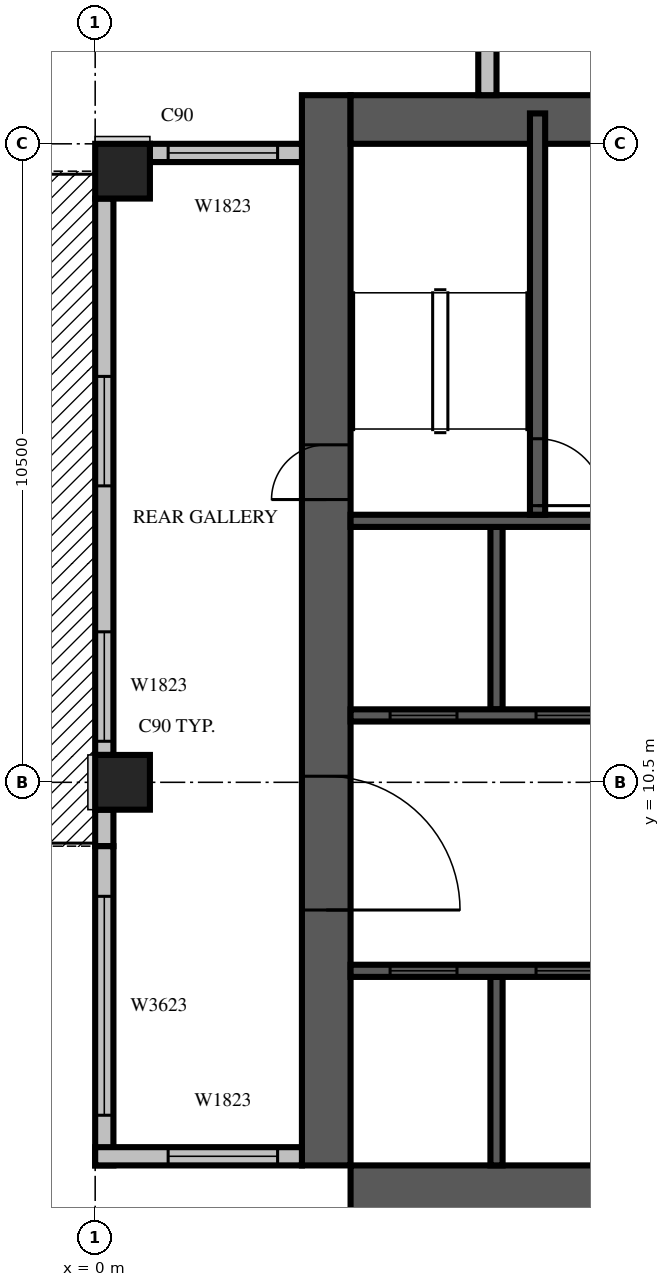
"""IFC4 building model, lengths in metres.
Left out: names, types, materials, properties, quantities, classifications, styles, units other than length and angle.
Written with IfcOpenShell. Run it as: python <this file> out.ifc"""

import sys

from ifc_helpers import new_model, si_unit, direction, frame, frame_2d, origin, origin_2d, place, context, subcontext, project, spatial, rectangle, extrude, source, transform, mapped, element, fill, save


model = new_model("IFC4")
c1 = context("Model", 3, precision=1e-05, world=origin(), true_north=direction((0.0, 1.0)))
c2 = subcontext(c1, "Body", "Model", "MODEL_VIEW")
j1 = project(units=[si_unit("LENGTHUNIT", "METRE"), si_unit("PLANEANGLEUNIT", "RADIAN")], contexts=[c1])
p1 = place(None, origin())
s1 = spatial("IfcSite", under=j1, at=p1, CompositionType="ELEMENT")
p2 = place(p1, origin())
s2 = spatial("IfcBuilding", under=s1, at=p2, CompositionType="ELEMENT")
p3 = place(p2, frame((0.0, 0.0, 200.6)))
s3 = spatial("IfcBuildingStorey", under=s2, at=p3, CompositionType="ELEMENT", Elevation=200.6)
m1 = source(origin(), c2, "Body", "SweptSolid", [
    extrude(rectangle(XDim=0.9, YDim=0.9, at=origin_2d()), origin(), (0.0, 0.0, 1.0), 3.8),
])
for number, where, z_axis, x_axis in (
    (1, (0.45, 10.5, 0.0), (0.0, 0.0, 1.0), (1.0, 0.0, 0.0)),
    (2, (0.45, 20.55, 0.0), (0.0, 0.0, 1.0), (1.0, 0.0, 0.0)),
):
    element("IfcColumn", number, at=place(p3, frame(where, z_axis=z_axis, x_axis=x_axis)), inside=s3, PredefinedType="COLUMN", context=c2, shape_type="MappedRepresentation", body=[
        mapped(m1, transform((0.0, 0.0, 0.0), scale=1.0)),
    ])
m2 = source(origin(), c2, "Body", "SweptSolid", [
    extrude(rectangle(XDim=17.6, YDim=0.8, at=frame_2d((8.8, 0.0))), origin(), (0.0, 0.0, 1.0), 3.8),
])
p4 = place(p3, frame((3.8, 4.2, 0.0), z_axis=(0.0, 0.0, 1.0), x_axis=(0.0, 1.0, 0.0)))
e3 = element("IfcWall", 3, at=p4, inside=s3, PredefinedType="SHEAR", context=c2, shape_type="MappedRepresentation", body=[
    mapped(m2, transform((0.0, 0.0, 0.0), scale=1.0)),
])
m3 = source(origin(), c2, "Body", "SweptSolid", [
    extrude(rectangle(XDim=2.2, YDim=2.1, at=frame_2d((1.1, 1.05))), frame((0.0, 0.41, 0.0), z_axis=(0.0, -1.0, 0.0), x_axis=(1.0, 0.0, 0.0)), (0.0, 0.0, 1.0), 0.82),
])
p5 = place(p4, frame((4.2, 0.0, 0.0)))
e4 = element("IfcOpeningElement", 4, at=p5, cuts=e3, PredefinedType="OPENING", context=c2, shape_type="MappedRepresentation", body=[
    mapped(m3, transform((0.0, 0.0, 0.0), scale=1.0)),
])
m4 = source(origin(), c2, "Body", "SweptSolid", [
    extrude(rectangle(XDim=0.9, YDim=2.1, at=frame_2d((0.45, 1.05))), frame((0.0, 0.41, 0.0), z_axis=(0.0, -1.0, 0.0), x_axis=(1.0, 0.0, 0.0)), (0.0, 0.0, 1.0), 0.82),
])
p6 = place(p4, frame((10.95, 0.0, 0.0)))
e5 = element("IfcOpeningElement", 5, at=p6, cuts=e3, PredefinedType="OPENING", context=c2, shape_type="MappedRepresentation", body=[
    mapped(m4, transform((0.0, 0.0, 0.0), scale=1.0)),
])
p7 = place(p3, frame((4.2, 3.8, 0.0), z_axis=(0.0, 0.0, 1.0), x_axis=(1.0, 0.0, 0.0)))
e6 = element("IfcWall", 6, at=p7, inside=s3, PredefinedType="SHEAR", context=c2, shape_type="MappedRepresentation", body=[
    mapped(m2, transform((0.0, 0.0, 0.0), scale=1.0)),
])
p8 = place(p7, frame((12.75, 0.0, 0.0)))
e7 = element("IfcOpeningElement", 7, at=p8, cuts=e6, PredefinedType="OPENING", context=c2, shape_type="MappedRepresentation", body=[
    mapped(m4, transform((0.0, 0.0, 0.0), scale=1.0)),
])
m5 = source(origin(), c2, "Body", "SweptSolid", [
    extrude(rectangle(XDim=16.8, YDim=0.8, at=frame_2d((8.4, 0.0))), origin(), (0.0, 0.0, 1.0), 3.8),
])
p9 = place(p3, frame((4.2, 21.4, 0.0), z_axis=(0.0, 0.0, 1.0), x_axis=(1.0, 0.0, 0.0)))
e8 = element("IfcWall", 8, at=p9, inside=s3, PredefinedType="SHEAR", context=c2, shape_type="MappedRepresentation", body=[
    mapped(m5, transform((0.0, 0.0, 0.0), scale=1.0)),
])
m6 = source(origin(), c2, "Body", "SweptSolid", [
    extrude(rectangle(XDim=1.2, YDim=2.1, at=frame_2d((0.6, 1.05))), frame((0.0, 0.41, 0.0), z_axis=(0.0, -1.0, 0.0), x_axis=(1.0, 0.0, 0.0)), (0.0, 0.0, 1.0), 0.82),
])
p10 = place(p9, frame((6.2, 0.0, 0.0)))
e9 = element("IfcOpeningElement", 9, at=p10, cuts=e8, PredefinedType="OPENING", context=c2, shape_type="MappedRepresentation", body=[
    mapped(m6, transform((0.0, 0.0, 0.0), scale=1.0)),
])
m7 = source(origin(), c2, "Body", "SweptSolid", [
    extrude(rectangle(XDim=16.6, YDim=0.3, at=frame_2d((8.3, 0.0))), origin(), (0.0, 0.0, 1.0), 3.4),
])
p11 = place(p3, frame((6.45, 38.4, 0.0), z_axis=(0.0, 0.0, 1.0), x_axis=(0.0, -1.0, 0.0)))
e10 = element("IfcWall", 10, at=p11, inside=s3, PredefinedType="STANDARD", context=c2, shape_type="MappedRepresentation", body=[
    mapped(m7, transform((0.0, 0.0, 0.0), scale=1.0)),
])
m8 = source(origin(), c2, "Body", "SweptSolid", [
    extrude(rectangle(XDim=1.8, YDim=2.3, at=frame_2d((0.9, 1.15))), frame((0.0, 0.16, 0.0), z_axis=(0.0, -1.0, 0.0), x_axis=(1.0, 0.0, 0.0)), (0.0, 0.0, 1.0), 0.32),
])
p12 = place(p11, frame((1.15, 0.0, 0.6)))
e11 = element("IfcOpeningElement", 11, at=p12, cuts=e10, PredefinedType="OPENING", context=c2, shape_type="MappedRepresentation", body=[
    mapped(m8, transform((0.0, 0.0, 0.0), scale=1.0)),
])
p13 = place(p11, frame((9.438, 0.0, 0.6)))
e12 = element("IfcOpeningElement", 12, at=p13, cuts=e10, PredefinedType="OPENING", context=c2, shape_type="MappedRepresentation", body=[
    mapped(m8, transform((0.0, 0.0, 0.0), scale=1.0)),
])
m9 = source(origin(), c2, "Body", "SweptSolid", [
    extrude(rectangle(XDim=1.2, YDim=2.3, at=frame_2d((0.6, 1.15))), frame((0.0, 0.16, 0.0), z_axis=(0.0, -1.0, 0.0), x_axis=(1.0, 0.0, 0.0)), (0.0, 0.0, 1.0), 0.32),
])
p14 = place(p11, frame((14.338, 0.0, 0.6)))
e13 = element("IfcOpeningElement", 13, at=p14, cuts=e10, PredefinedType="OPENING", context=c2, shape_type="MappedRepresentation", body=[
    mapped(m9, transform((0.0, 0.0, 0.0), scale=1.0)),
])
p15 = place(p11, frame((11.887, 0.0, 0.6)))
e14 = element("IfcOpeningElement", 14, at=p15, cuts=e10, PredefinedType="OPENING", context=c2, shape_type="MappedRepresentation", body=[
    mapped(m8, transform((0.0, 0.0, 0.0), scale=1.0)),
])
m10 = source(origin(), c2, "Body", "SweptSolid", [
    extrude(rectangle(XDim=1.0, YDim=2.1, at=frame_2d((0.5, 1.05))), frame((0.0, 0.16, 0.0), z_axis=(0.0, -1.0, 0.0), x_axis=(1.0, 0.0, 0.0)), (0.0, 0.0, 1.0), 0.32),
])
p16 = place(p11, frame((5.908, 0.0, 0.0)))
e15 = element("IfcOpeningElement", 15, at=p16, cuts=e10, PredefinedType="OPENING", context=c2, shape_type="MappedRepresentation", body=[
    mapped(m10, transform((0.0, 0.0, 0.0), scale=1.0)),
])
m11 = source(origin(), c2, "Body", "SweptSolid", [
    extrude(rectangle(XDim=2.5, YDim=0.3, at=frame_2d((1.25, 0.0))), origin(), (0.0, 0.0, 1.0), 3.4),
])
p17 = place(p3, frame((3.4, 20.85, 0.0), z_axis=(0.0, 0.0, 1.0), x_axis=(-1.0, 0.0, 0.0)))
e16 = element("IfcWall", 16, at=p17, inside=s3, PredefinedType="STANDARD", context=c2, shape_type="MappedRepresentation", body=[
    mapped(m11, transform((0.0, 0.0, 0.0), scale=1.0)),
])
p18 = place(p17, frame((0.4, 0.0, 0.6)))
e17 = element("IfcOpeningElement", 17, at=p18, cuts=e16, PredefinedType="OPENING", context=c2, shape_type="MappedRepresentation", body=[
    mapped(m8, transform((0.0, 0.0, 0.0), scale=1.0)),
])
m12 = source(origin(), c2, "Body", "SweptSolid", [
    extrude(rectangle(XDim=9.15, YDim=0.3, at=frame_2d((4.575, 0.0))), origin(), (0.0, 0.0, 1.0), 3.4),
])
p19 = place(p3, frame((0.15, 20.1, 0.0), z_axis=(0.0, 0.0, 1.0), x_axis=(0.0, -1.0, 0.0)))
e18 = element("IfcWall", 18, at=p19, inside=s3, PredefinedType="STANDARD", context=c2, shape_type="MappedRepresentation", body=[
    mapped(m12, transform((0.0, 0.0, 0.0), scale=1.0)),
])
m13 = source(origin(), c2, "Body", "SweptSolid", [
    extrude(rectangle(XDim=1.8, YDim=2.4, at=frame_2d((0.9, 1.2))), frame((0.0, 0.16, 0.0), z_axis=(0.0, -1.0, 0.0), x_axis=(1.0, 0.0, 0.0)), (0.0, 0.0, 1.0), 0.32),
])
p20 = place(p19, frame((2.925, 0.0, 0.0)))
e19 = element("IfcOpeningElement", 19, at=p20, cuts=e18, PredefinedType="OPENING", context=c2, shape_type="MappedRepresentation", body=[
    mapped(m13, transform((0.0, 0.0, 0.0), scale=1.0)),
])
p21 = place(p19, frame((7.125, 0.0, 0.6)))
e20 = element("IfcOpeningElement", 20, at=p21, cuts=e18, PredefinedType="OPENING", context=c2, shape_type="MappedRepresentation", body=[
    mapped(m8, transform((0.0, 0.0, 0.0), scale=1.0)),
])
m14 = source(origin(), c2, "Body", "SweptSolid", [
    extrude(rectangle(XDim=0.6, YDim=0.3, at=frame_2d((0.3, 0.0))), origin(), (0.0, 0.0, 1.0), 3.4),
])
p22 = place(p3, frame((0.15, 10.05, 0.0), z_axis=(0.0, 0.0, 1.0), x_axis=(0.0, -1.0, 0.0)))
e21 = element("IfcWall", 21, at=p22, inside=s3, PredefinedType="STANDARD", context=c2, shape_type="MappedRepresentation", body=[
    mapped(m14, transform((0.0, 0.0, 0.0), scale=1.0)),
])
m15 = source(origin(), c2, "Body", "SweptSolid", [
    extrude(rectangle(XDim=5.25, YDim=0.3, at=frame_2d((2.625, 0.0))), origin(), (0.0, 0.0, 1.0), 3.4),
])
p23 = place(p3, frame((0.15, 9.45, 0.0), z_axis=(0.0, 0.0, 1.0), x_axis=(0.0, -1.0, 0.0)))
e22 = element("IfcWall", 22, at=p23, inside=s3, PredefinedType="STANDARD", context=c2, shape_type="MappedRepresentation", body=[
    mapped(m15, transform((0.0, 0.0, 0.0), scale=1.0)),
])
m16 = source(origin(), c2, "Body", "SweptSolid", [
    extrude(rectangle(XDim=3.6, YDim=2.3, at=frame_2d((1.8, 1.15))), frame((0.0, 0.16, 0.0), z_axis=(0.0, -1.0, 0.0), x_axis=(1.0, 0.0, 0.0)), (0.0, 0.0, 1.0), 0.32),
])
p24 = place(p23, frame((0.825, 0.0, 0.6)))
e23 = element("IfcOpeningElement", 23, at=p24, cuts=e22, PredefinedType="OPENING", context=c2, shape_type="MappedRepresentation", body=[
    mapped(m16, transform((0.0, 0.0, 0.0), scale=1.0)),
])
m17 = source(origin(), c2, "Body", "SweptSolid", [
    extrude(rectangle(XDim=3.4, YDim=0.3, at=frame_2d((1.7, 0.0))), origin(), (0.0, 0.0, 1.0), 3.4),
])
p25 = place(p3, frame((0.0, 4.35, 0.0), z_axis=(0.0, 0.0, 1.0), x_axis=(1.0, 0.0, 0.0)))
e24 = element("IfcWall", 24, at=p25, inside=s3, PredefinedType="STANDARD", context=c2, shape_type="MappedRepresentation", body=[
    mapped(m17, transform((0.0, 0.0, 0.0), scale=1.0)),
])
p26 = place(p25, frame((1.2, 0.0, 0.6)))
e25 = element("IfcOpeningElement", 25, at=p26, cuts=e24, PredefinedType="OPENING", context=c2, shape_type="MappedRepresentation", body=[
    mapped(m8, transform((0.0, 0.0, 0.0), scale=1.0)),
])
m18 = source(origin(), c2, "Body", "SweptSolid", [
    extrude(rectangle(XDim=3.1, YDim=0.2, at=frame_2d((1.55, 0.0))), origin(), (0.0, 0.0, 1.0), 3.8),
])
p27 = place(p3, frame((6.6, 4.2, 0.0), z_axis=(0.0, 0.0, 1.0), x_axis=(0.0, 1.0, 0.0)))
e26 = element("IfcWall", 26, at=p27, inside=s3, PredefinedType="SOLIDWALL", context=c2, shape_type="MappedRepresentation", body=[
    mapped(m18, transform((0.0, 0.0, 0.0), scale=1.0)),
])
m19 = source(origin(), c2, "Body", "SweptSolid", [
    extrude(rectangle(XDim=3.0, YDim=0.2, at=frame_2d((1.5, 0.0))), origin(), (0.0, 0.0, 1.0), 3.8),
])
p28 = place(p3, frame((6.6, 11.7, 0.0), z_axis=(0.0, 0.0, 1.0), x_axis=(0.0, 1.0, 0.0)))
e27 = element("IfcWall", 27, at=p28, inside=s3, PredefinedType="SOLIDWALL", context=c2, shape_type="MappedRepresentation", body=[
    mapped(m19, transform((0.0, 0.0, 0.0), scale=1.0)),
])
m20 = source(origin(), c2, "Body", "SweptSolid", [
    extrude(rectangle(XDim=9.6, YDim=0.2, at=frame_2d((4.8, 0.0))), origin(), (0.0, 0.0, 1.0), 3.8),
])
p29 = place(p3, frame((4.2, 7.4, 0.0), z_axis=(0.0, 0.0, 1.0), x_axis=(1.0, 0.0, 0.0)))
e28 = element("IfcWall", 28, at=p29, inside=s3, PredefinedType="SOLIDWALL", context=c2, shape_type="MappedRepresentation", body=[
    mapped(m20, transform((0.0, 0.0, 0.0), scale=1.0)),
])
m21 = source(origin(), c2, "Body", "SweptSolid", [
    extrude(rectangle(XDim=1.1, YDim=2.1, at=frame_2d((0.55, 1.05))), frame((0.0, 0.11, 0.0), z_axis=(0.0, -1.0, 0.0), x_axis=(1.0, 0.0, 0.0)), (0.0, 0.0, 1.0), 0.22),
])
p30 = place(p29, frame((0.65, 0.0, 0.0)))
e29 = element("IfcOpeningElement", 29, at=p30, cuts=e28, PredefinedType="OPENING", context=c2, shape_type="MappedRepresentation", body=[
    mapped(m21, transform((0.0, 0.0, 0.0), scale=1.0)),
])
p31 = place(p29, frame((3.05, 0.0, 0.0)))
e30 = element("IfcOpeningElement", 30, at=p31, cuts=e28, PredefinedType="OPENING", context=c2, shape_type="MappedRepresentation", body=[
    mapped(m21, transform((0.0, 0.0, 0.0), scale=1.0)),
])
p32 = place(p29, frame((5.45, 0.0, 0.0)))
e31 = element("IfcOpeningElement", 31, at=p32, cuts=e28, PredefinedType="OPENING", context=c2, shape_type="MappedRepresentation", body=[
    mapped(m21, transform((0.0, 0.0, 0.0), scale=1.0)),
])
p33 = place(p29, frame((7.85, 0.0, 0.0)))
e32 = element("IfcOpeningElement", 32, at=p33, cuts=e28, PredefinedType="OPENING", context=c2, shape_type="MappedRepresentation", body=[
    mapped(m21, transform((0.0, 0.0, 0.0), scale=1.0)),
])
m22 = source(origin(), c2, "Body", "SweptSolid", [
    extrude(rectangle(XDim=4.8, YDim=0.2, at=frame_2d((2.4, 0.0))), origin(), (0.0, 0.0, 1.0), 3.8),
])
p34 = place(p3, frame((4.2, 11.6, 0.0), z_axis=(0.0, 0.0, 1.0), x_axis=(1.0, 0.0, 0.0)))
e33 = element("IfcWall", 33, at=p34, inside=s3, PredefinedType="SOLIDWALL", context=c2, shape_type="MappedRepresentation", body=[
    mapped(m22, transform((0.0, 0.0, 0.0), scale=1.0)),
])
p35 = place(p34, frame((0.65, 0.0, 0.0)))
e34 = element("IfcOpeningElement", 34, at=p35, cuts=e33, PredefinedType="OPENING", context=c2, shape_type="MappedRepresentation", body=[
    mapped(m21, transform((0.0, 0.0, 0.0), scale=1.0)),
])
p36 = place(p34, frame((3.05, 0.0, 0.0)))
e35 = element("IfcOpeningElement", 35, at=p36, cuts=e33, PredefinedType="OPENING", context=c2, shape_type="MappedRepresentation", body=[
    mapped(m21, transform((0.0, 0.0, 0.0), scale=1.0)),
])
p37 = place(p3, frame((4.2, 14.8, 0.0), z_axis=(0.0, 0.0, 1.0), x_axis=(1.0, 0.0, 0.0)))
e36 = element("IfcWall", 36, at=p37, inside=s3, PredefinedType="SOLIDWALL", context=c2, shape_type="MappedRepresentation", body=[
    mapped(m22, transform((0.0, 0.0, 0.0), scale=1.0)),
])
m23 = source(origin(), c2, "Body", "SweptSolid", [
    extrude(rectangle(XDim=6.6, YDim=0.25, at=frame_2d((3.3, 0.0))), origin(), (0.0, 0.0, 1.0), 3.4),
])
p38 = place(p3, frame((7.275, 14.9, 0.0), z_axis=(0.0, 0.0, 1.0), x_axis=(0.0, 1.0, 0.0)))
e37 = element("IfcWall", 37, at=p38, inside=s3, PredefinedType="SOLIDWALL", context=c2, shape_type="MappedRepresentation", body=[
    mapped(m23, transform((0.0, 0.0, 0.0), scale=1.0)),
])
m24 = source(origin(), c2, "Body", "SweptSolid", [
    extrude(rectangle(XDim=1.1, YDim=2.1, at=frame_2d((0.55, 1.05))), frame((0.0, 0.135, 0.0), z_axis=(0.0, -1.0, 0.0), x_axis=(1.0, 0.0, 0.0)), (0.0, 0.0, 1.0), 0.27),
])
p39 = place(p38, frame((0.15, 0.0, 0.0)))
e38 = element("IfcOpeningElement", 38, at=p39, cuts=e37, PredefinedType="OPENING", context=c2, shape_type="MappedRepresentation", body=[
    mapped(m24, transform((0.0, 0.0, 0.0), scale=1.0)),
])
m25 = source(origin(), c2, "Body", "SweptSolid", [
    extrude(rectangle(XDim=1.8, YDim=2.3, at=frame_2d((0.9, 1.15))), frame((0.0, 0.03, 0.0), z_axis=(0.0, -1.0, 0.0), x_axis=(1.0, 0.0, 0.0)), (0.0, 0.0, 1.0), 0.06),
])
p40 = place(p18, origin())
e39 = element("IfcWindow", 39, at=p40, inside=s3, PartitioningType="SINGLE_PANEL", PredefinedType="WINDOW", context=c2, shape_type="MappedRepresentation", body=[
    mapped(m25, transform((0.0, 0.0, 0.0), scale=1.0)),
])
fill(e17, e39)
m26 = source(origin(), c2, "Body", "SweptSolid", [
    extrude(rectangle(XDim=1.8, YDim=2.4, at=frame_2d((0.9, 1.2))), frame((0.0, 0.025, 0.0), z_axis=(0.0, -1.0, 0.0), x_axis=(1.0, 0.0, 0.0)), (0.0, 0.0, 1.0), 0.05),
])
p41 = place(p20, origin())
e40 = element("IfcDoor", 40, at=p41, inside=s3, OperationType="SLIDING_TO_LEFT", PredefinedType="DOOR", context=c2, shape_type="MappedRepresentation", body=[
    mapped(m26, transform((0.0, 0.0, 0.0), scale=1.0)),
])
fill(e19, e40)
p42 = place(p21, origin())
e41 = element("IfcWindow", 41, at=p42, inside=s3, PartitioningType="SINGLE_PANEL", PredefinedType="WINDOW", context=c2, shape_type="MappedRepresentation", body=[
    mapped(m25, transform((0.0, 0.0, 0.0), scale=1.0)),
])
fill(e20, e41)
m27 = source(origin(), c2, "Body", "SweptSolid", [
    extrude(rectangle(XDim=3.6, YDim=2.3, at=frame_2d((1.8, 1.15))), frame((0.0, 0.03, 0.0), z_axis=(0.0, -1.0, 0.0), x_axis=(1.0, 0.0, 0.0)), (0.0, 0.0, 1.0), 0.06),
])
p43 = place(p24, origin())
e42 = element("IfcWindow", 42, at=p43, inside=s3, PartitioningType="SINGLE_PANEL", PredefinedType="WINDOW", context=c2, shape_type="MappedRepresentation", body=[
    mapped(m27, transform((0.0, 0.0, 0.0), scale=1.0)),
])
fill(e23, e42)
p44 = place(p26, origin())
e43 = element("IfcWindow", 43, at=p44, inside=s3, PartitioningType="SINGLE_PANEL", PredefinedType="WINDOW", context=c2, shape_type="MappedRepresentation", body=[
    mapped(m25, transform((0.0, 0.0, 0.0), scale=1.0)),
])
fill(e25, e43)
m28 = source(origin(), c2, "Body", "SweptSolid", [
    extrude(rectangle(XDim=1.1, YDim=2.1, at=frame_2d((0.55, 1.05))), frame((0.0, 0.025, 0.0), z_axis=(0.0, -1.0, 0.0), x_axis=(1.0, 0.0, 0.0)), (0.0, 0.0, 1.0), 0.05),
])
p45 = place(p30, origin())
e44 = element("IfcDoor", 44, at=p45, inside=s3, OperationType="SLIDING_TO_LEFT", PredefinedType="DOOR", context=c2, shape_type="MappedRepresentation", body=[
    mapped(m28, transform((0.0, 0.0, 0.0), scale=1.0)),
])
fill(e29, e44)
p46 = place(p31, origin())
e45 = element("IfcDoor", 45, at=p46, inside=s3, OperationType="SLIDING_TO_LEFT", PredefinedType="DOOR", context=c2, shape_type="MappedRepresentation", body=[
    mapped(m28, transform((0.0, 0.0, 0.0), scale=1.0)),
])
fill(e30, e45)
p47 = place(p35, origin())
e46 = element("IfcDoor", 46, at=p47, inside=s3, OperationType="SLIDING_TO_LEFT", PredefinedType="DOOR", context=c2, shape_type="MappedRepresentation", body=[
    mapped(m28, transform((0.0, 0.0, 0.0), scale=1.0)),
])
fill(e34, e46)
p48 = place(p36, origin())
e47 = element("IfcDoor", 47, at=p48, inside=s3, OperationType="SLIDING_TO_LEFT", PredefinedType="DOOR", context=c2, shape_type="MappedRepresentation", body=[
    mapped(m28, transform((0.0, 0.0, 0.0), scale=1.0)),
])
fill(e35, e47)
p49 = place(p39, origin())
e48 = element("IfcDoor", 48, at=p49, inside=s3, OperationType="SINGLE_SWING_RIGHT", PredefinedType="DOOR", context=c2, shape_type="MappedRepresentation", body=[
    mapped(m28, transform((0.0, 0.0, 0.0), scale=1.0)),
])
fill(e38, e48)
m29 = source(origin(), c2, "Body", "SweptSolid", [
    extrude(rectangle(XDim=2.2, YDim=2.1, at=frame_2d((1.1, 1.05))), frame((0.0, 0.025, 0.0), z_axis=(0.0, -1.0, 0.0), x_axis=(1.0, 0.0, 0.0)), (0.0, 0.0, 1.0), 0.05),
])
p50 = place(p5, origin())
e49 = element("IfcDoor", 49, at=p50, inside=s3, OperationType="DOUBLE_DOOR_SINGLE_SWING", PredefinedType="DOOR", context=c2, shape_type="MappedRepresentation", body=[
    mapped(m29, transform((0.0, 0.0, 0.0), scale=1.0)),
])
fill(e4, e49)
m30 = source(origin(), c2, "Body", "SweptSolid", [
    extrude(rectangle(XDim=0.9, YDim=2.1, at=frame_2d((0.45, 1.05))), frame((0.0, 0.025, 0.0), z_axis=(0.0, -1.0, 0.0), x_axis=(1.0, 0.0, 0.0)), (0.0, 0.0, 1.0), 0.05),
])
p51 = place(p6, origin())
e50 = element("IfcDoor", 50, at=p51, inside=s3, OperationType="SINGLE_SWING_LEFT", PredefinedType="DOOR", context=c2, shape_type="MappedRepresentation", body=[
    mapped(m30, transform((0.0, 0.0, 0.0), scale=1.0)),
])
fill(e5, e50)
save(model, sys.argv[1])
